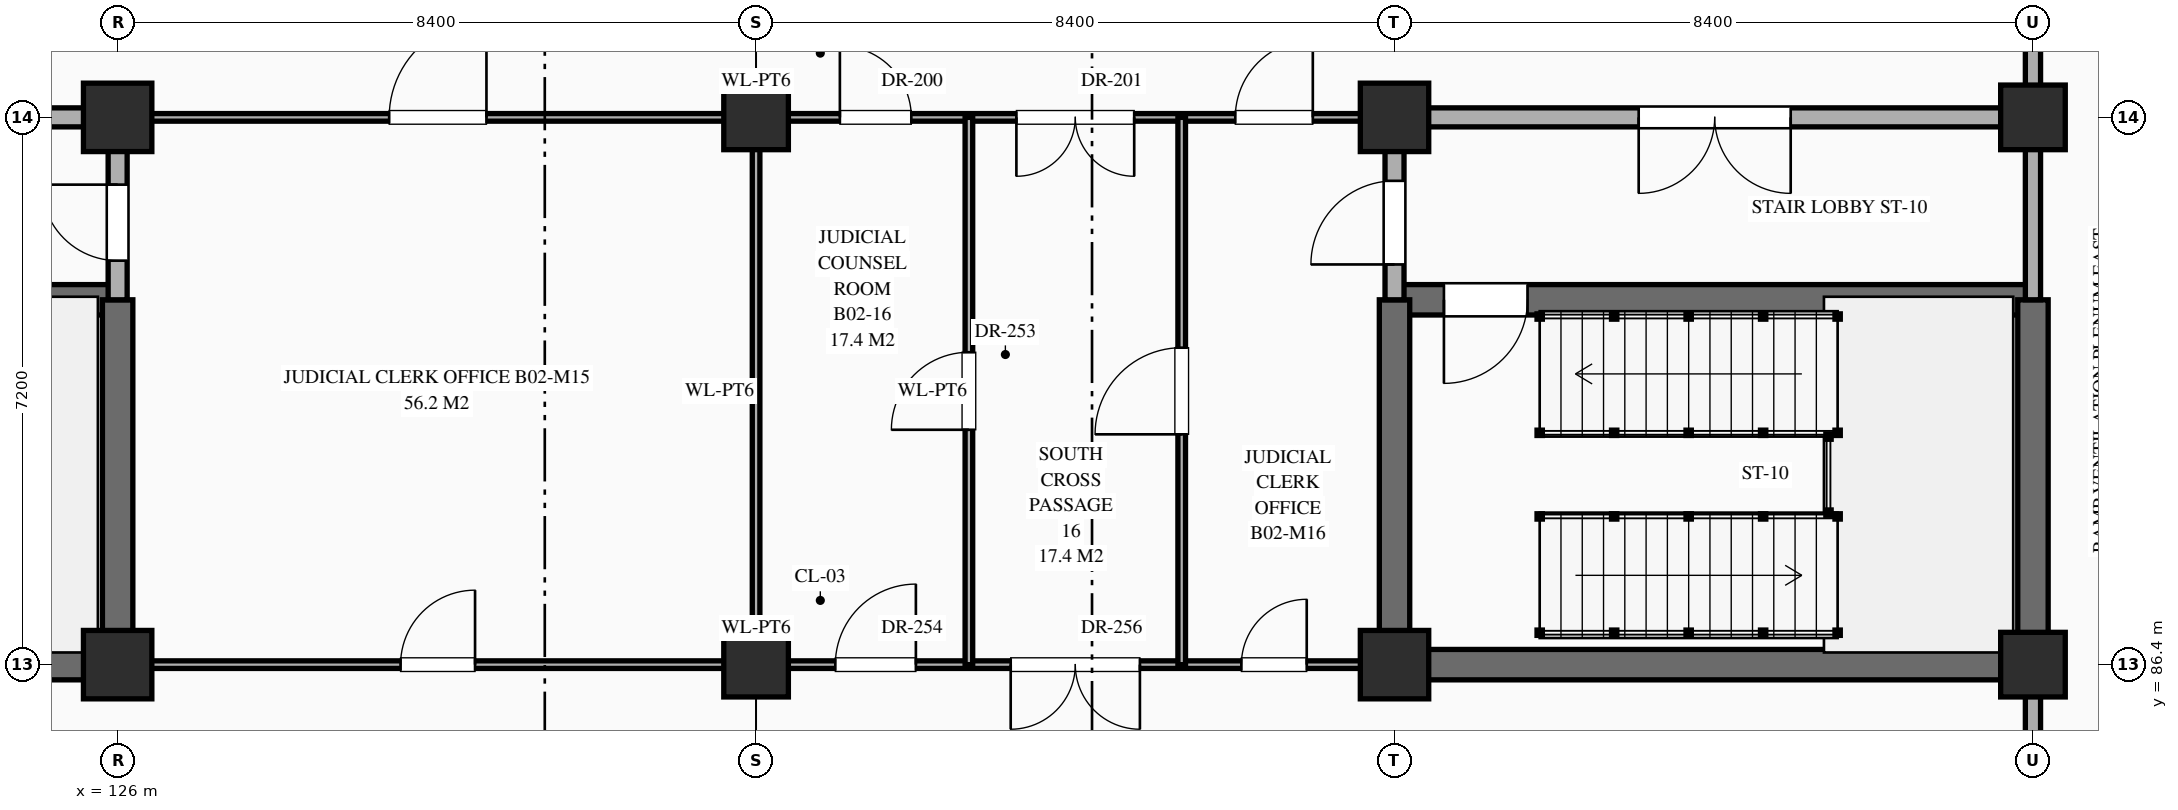
"""IFC4 building model, lengths in metres.
Left out: names, types, materials, properties, quantities, classifications, styles, units other than length and angle.
Written with IfcOpenShell. Run it as: python <this file> out.ifc"""

import sys

from ifc_helpers import new_model, si_unit, direction, frame, frame_2d, origin, origin_2d, place, context, subcontext, project, spatial, rectangle, extrude, element, fill, save


model = new_model("IFC4")
c1 = context("Model", 3, precision=1e-05, world=origin(), true_north=direction((0.0, 1.0)))
c2 = subcontext(c1, "Body", "Model", "MODEL_VIEW")
j1 = project(units=[si_unit("LENGTHUNIT", "METRE"), si_unit("PLANEANGLEUNIT", "RADIAN")], contexts=[c1])
p1 = place(None, origin())
s1 = spatial("IfcSite", under=j1, at=p1, CompositionType="ELEMENT")
p2 = place(p1, origin())
s2 = spatial("IfcBuilding", under=s1, at=p2, CompositionType="ELEMENT")
p3 = place(p2, frame((0.0, 0.0, -10.2)))
s3 = spatial("IfcBuildingStorey", under=s2, at=p3, CompositionType="ELEMENT", Elevation=-10.2)
for number, where, z_axis, x_axis in (
    (1, (126.0, 86.4, 0.0), (0.0, 0.0, 1.0), (1.0, 0.0, 0.0)),
    (2, (126.0, 93.6, 0.0), (0.0, 0.0, 1.0), (1.0, 0.0, 0.0)),
):
    element("IfcColumn", number, at=place(p3, frame(where, z_axis=z_axis, x_axis=x_axis)), inside=s3, PredefinedType="COLUMN", context=c2, shape_type="SweptSolid", body=[
        extrude(rectangle(XDim=0.9, YDim=0.9, at=origin_2d()), origin(), (0.0, 0.0, 1.0), 4.8),
    ])
for number, where, z_axis, x_axis in (
    (3, (134.4, 86.4, 0.0), (0.0, 0.0, 1.0), (1.0, 0.0, 0.0)),
    (4, (134.4, 93.6, 0.0), (0.0, 0.0, 1.0), (1.0, 0.0, 0.0)),
):
    element("IfcColumn", number, at=place(p3, frame(where, z_axis=z_axis, x_axis=x_axis)), inside=s3, PredefinedType="COLUMN", context=c2, shape_type="SweptSolid", body=[
        extrude(rectangle(XDim=0.85, YDim=0.85, at=origin_2d()), origin(), (0.0, 0.0, 1.0), 4.8),
    ])
for number, where, z_axis, x_axis in (
    (5, (142.8, 86.4, 0.0), (0.0, 0.0, 1.0), (1.0, 0.0, 0.0)),
    (6, (142.8, 93.6, 0.0), (0.0, 0.0, 1.0), (1.0, 0.0, 0.0)),
):
    element("IfcColumn", number, at=place(p3, frame(where, z_axis=z_axis, x_axis=x_axis)), inside=s3, PredefinedType="COLUMN", context=c2, shape_type="SweptSolid", body=[
        extrude(rectangle(XDim=0.9, YDim=0.9, at=origin_2d()), origin(), (0.0, 0.0, 1.0), 4.8),
    ])
for number, where, z_axis, x_axis in (
    (7, (151.2, 86.4, 0.0), (0.0, 0.0, 1.0), (1.0, 0.0, 0.0)),
    (8, (151.2, 93.6, 0.0), (0.0, 0.0, 1.0), (1.0, 0.0, 0.0)),
):
    element("IfcColumn", number, at=place(p3, frame(where, z_axis=z_axis, x_axis=x_axis)), inside=s3, PredefinedType="COLUMN", context=c2, shape_type="SweptSolid", body=[
        extrude(rectangle(XDim=0.85, YDim=0.85, at=origin_2d()), origin(), (0.0, 0.0, 1.0), 4.8),
    ])
p4 = place(p3, frame((117.6, 86.4, 0.0), z_axis=(0.0, 0.0, 1.0), x_axis=(1.0, 0.0, 0.0)))
e9 = element("IfcWall", 9, at=p4, inside=s3, PredefinedType="SHEAR", context=c2, shape_type="SweptSolid", body=[
    extrude(rectangle(XDim=8.4, YDim=0.4, at=frame_2d((4.2, 0.0))), origin(), (0.0, 0.0, 1.0), 4.48),
])
p5 = place(p3, frame((126.0, 86.4, 0.0), z_axis=(0.0, 0.0, 1.0), x_axis=(1.0, 0.0, 0.0)))
e10 = element("IfcWall", 10, at=p5, inside=s3, PredefinedType="STANDARD", context=c2, shape_type="SweptSolid", body=[
    extrude(rectangle(XDim=16.8, YDim=0.1, at=frame_2d((8.4, 0.0))), origin(), (0.0, 0.0, 1.0), 3.63),
])
p6 = place(p5, frame((3.722, 0.0, 0.0)))
e11 = element("IfcOpeningElement", 11, at=p6, cuts=e10, PredefinedType="OPENING", context=c2, shape_type="SweptSolid", body=[
    extrude(rectangle(XDim=0.98, YDim=2.35, at=frame_2d((0.49, 1.175))), frame((0.0, 0.062, 0.0), z_axis=(0.0, -1.0, 0.0), x_axis=(1.0, 0.0, 0.0)), (0.0, 0.0, 1.0), 0.124),
])
p7 = place(p5, frame((9.442, 0.0, 0.0)))
e12 = element("IfcOpeningElement", 12, at=p7, cuts=e10, PredefinedType="OPENING", context=c2, shape_type="SweptSolid", body=[
    extrude(rectangle(XDim=1.06, YDim=2.4, at=frame_2d((0.53, 1.2))), frame((0.0, 0.062, 0.0), z_axis=(0.0, -1.0, 0.0), x_axis=(1.0, 0.0, 0.0)), (0.0, 0.0, 1.0), 0.124),
])
p8 = place(p5, frame((11.75, 0.0, 0.0)))
e13 = element("IfcOpeningElement", 13, at=p8, cuts=e10, PredefinedType="OPENING", context=c2, shape_type="SweptSolid", body=[
    extrude(rectangle(XDim=1.7, YDim=2.45, at=frame_2d((0.85, 1.225))), frame((0.0, 0.062, 0.0), z_axis=(0.0, -1.0, 0.0), x_axis=(1.0, 0.0, 0.0)), (0.0, 0.0, 1.0), 0.124),
])
p9 = place(p5, frame((14.785, 0.0, 0.0)))
e14 = element("IfcOpeningElement", 14, at=p9, cuts=e10, PredefinedType="OPENING", context=c2, shape_type="SweptSolid", body=[
    extrude(rectangle(XDim=0.86, YDim=2.1, at=frame_2d((0.43, 1.05))), frame((0.0, 0.062, 0.0), z_axis=(0.0, -1.0, 0.0), x_axis=(1.0, 0.0, 0.0)), (0.0, 0.0, 1.0), 0.124),
])
p10 = place(p3, frame((142.8, 86.4, 0.0), z_axis=(0.0, 0.0, 1.0), x_axis=(1.0, 0.0, 0.0)))
e15 = element("IfcWall", 15, at=p10, inside=s3, PredefinedType="SHEAR", context=c2, shape_type="SweptSolid", body=[
    extrude(rectangle(XDim=8.4, YDim=0.4, at=frame_2d((4.2, 0.0))), origin(), (0.0, 0.0, 1.0), 4.48),
])
p11 = place(p3, frame((117.6, 91.2, 0.0), z_axis=(0.0, 0.0, 1.0), x_axis=(1.0, 0.0, 0.0)))
e16 = element("IfcWall", 16, at=p11, inside=s3, PredefinedType="SHEAR", context=c2, shape_type="SweptSolid", body=[
    extrude(rectangle(XDim=8.4, YDim=0.4, at=frame_2d((4.2, 0.0))), origin(), (0.0, 0.0, 1.0), 4.48),
])
p12 = place(p11, frame((0.65, 0.0, 0.0)))
e17 = element("IfcOpeningElement", 17, at=p12, cuts=e16, PredefinedType="OPENING", context=c2, shape_type="SweptSolid", body=[
    extrude(rectangle(XDim=1.1, YDim=2.2, at=frame_2d((0.55, 1.1))), frame((0.0, 0.212, 0.0), z_axis=(0.0, -1.0, 0.0), x_axis=(1.0, 0.0, 0.0)), (0.0, 0.0, 1.0), 0.424),
])
p13 = place(p3, frame((142.8, 91.2, 0.0), z_axis=(0.0, 0.0, 1.0), x_axis=(1.0, 0.0, 0.0)))
e18 = element("IfcWall", 18, at=p13, inside=s3, PredefinedType="SHEAR", context=c2, shape_type="SweptSolid", body=[
    extrude(rectangle(XDim=8.4, YDim=0.4, at=frame_2d((4.2, 0.0))), origin(), (0.0, 0.0, 1.0), 4.48),
])
p14 = place(p13, frame((0.65, 0.0, 0.0)))
e19 = element("IfcOpeningElement", 19, at=p14, cuts=e18, PredefinedType="OPENING", context=c2, shape_type="SweptSolid", body=[
    extrude(rectangle(XDim=1.1, YDim=2.2, at=frame_2d((0.55, 1.1))), frame((0.0, 0.212, 0.0), z_axis=(0.0, -1.0, 0.0), x_axis=(1.0, 0.0, 0.0)), (0.0, 0.0, 1.0), 0.424),
])
p15 = place(p3, frame((117.6, 93.6, 0.0), z_axis=(0.0, 0.0, 1.0), x_axis=(1.0, 0.0, 0.0)))
e20 = element("IfcWall", 20, at=p15, inside=s3, PredefinedType="STANDARD", context=c2, shape_type="SweptSolid", body=[
    extrude(rectangle(XDim=8.4, YDim=0.25, at=frame_2d((4.2, 0.0))), origin(), (0.0, 0.0, 1.0), 3.63),
])
p16 = place(p15, frame((3.212, 0.0, 0.0)))
e21 = element("IfcOpeningElement", 21, at=p16, cuts=e20, PredefinedType="OPENING", context=c2, shape_type="SweptSolid", body=[
    extrude(rectangle(XDim=2.0, YDim=2.4, at=frame_2d((1.0, 1.2))), frame((0.0, 0.137, 0.0), z_axis=(0.0, -1.0, 0.0), x_axis=(1.0, 0.0, 0.0)), (0.0, 0.0, 1.0), 0.274),
])
p17 = place(p3, frame((126.0, 93.6, 0.0), z_axis=(0.0, 0.0, 1.0), x_axis=(1.0, 0.0, 0.0)))
e22 = element("IfcWall", 22, at=p17, inside=s3, PredefinedType="STANDARD", context=c2, shape_type="SweptSolid", body=[
    extrude(rectangle(XDim=16.8, YDim=0.1, at=frame_2d((8.4, 0.0))), origin(), (0.0, 0.0, 1.0), 3.63),
])
p18 = place(p17, frame((3.573, 0.0, 0.0)))
e23 = element("IfcOpeningElement", 23, at=p18, cuts=e22, PredefinedType="OPENING", context=c2, shape_type="SweptSolid", body=[
    extrude(rectangle(XDim=1.28, YDim=2.35, at=frame_2d((0.64, 1.175))), frame((0.0, 0.062, 0.0), z_axis=(0.0, -1.0, 0.0), x_axis=(1.0, 0.0, 0.0)), (0.0, 0.0, 1.0), 0.124),
])
p19 = place(p17, frame((9.502, 0.0, 0.0)))
e24 = element("IfcOpeningElement", 24, at=p19, cuts=e22, PredefinedType="OPENING", context=c2, shape_type="SweptSolid", body=[
    extrude(rectangle(XDim=0.94, YDim=2.3, at=frame_2d((0.47, 1.15))), frame((0.0, 0.062, 0.0), z_axis=(0.0, -1.0, 0.0), x_axis=(1.0, 0.0, 0.0)), (0.0, 0.0, 1.0), 0.124),
])
p20 = place(p17, frame((11.825, 0.0, 0.0)))
e25 = element("IfcOpeningElement", 25, at=p20, cuts=e22, PredefinedType="OPENING", context=c2, shape_type="SweptSolid", body=[
    extrude(rectangle(XDim=1.55, YDim=2.35, at=frame_2d((0.775, 1.175))), frame((0.0, 0.062, 0.0), z_axis=(0.0, -1.0, 0.0), x_axis=(1.0, 0.0, 0.0)), (0.0, 0.0, 1.0), 0.124),
])
p21 = place(p17, frame((14.705, 0.0, 0.0)))
e26 = element("IfcOpeningElement", 26, at=p21, cuts=e22, PredefinedType="OPENING", context=c2, shape_type="SweptSolid", body=[
    extrude(rectangle(XDim=1.02, YDim=2.4, at=frame_2d((0.51, 1.2))), frame((0.0, 0.062, 0.0), z_axis=(0.0, -1.0, 0.0), x_axis=(1.0, 0.0, 0.0)), (0.0, 0.0, 1.0), 0.124),
])
p22 = place(p3, frame((142.8, 93.6, 0.0), z_axis=(0.0, 0.0, 1.0), x_axis=(1.0, 0.0, 0.0)))
e27 = element("IfcWall", 27, at=p22, inside=s3, PredefinedType="STANDARD", context=c2, shape_type="SweptSolid", body=[
    extrude(rectangle(XDim=8.4, YDim=0.25, at=frame_2d((4.2, 0.0))), origin(), (0.0, 0.0, 1.0), 3.63),
])
p23 = place(p22, frame((3.212, 0.0, 0.0)))
e28 = element("IfcOpeningElement", 28, at=p23, cuts=e27, PredefinedType="OPENING", context=c2, shape_type="SweptSolid", body=[
    extrude(rectangle(XDim=2.0, YDim=2.4, at=frame_2d((1.0, 1.2))), frame((0.0, 0.137, 0.0), z_axis=(0.0, -1.0, 0.0), x_axis=(1.0, 0.0, 0.0)), (0.0, 0.0, 1.0), 0.274),
])
p24 = place(p3, frame((126.0, 86.4, 0.0), z_axis=(0.0, 0.0, 1.0), x_axis=(0.0, 1.0, 0.0)))
e29 = element("IfcWall", 29, at=p24, inside=s3, PredefinedType="SHEAR", context=c2, shape_type="SweptSolid", body=[
    extrude(rectangle(XDim=4.8, YDim=0.4, at=frame_2d((2.4, 0.0))), origin(), (0.0, 0.0, 1.0), 4.48),
])
p25 = place(p3, frame((126.0, 91.2, 0.0), z_axis=(0.0, 0.0, 1.0), x_axis=(0.0, 1.0, 0.0)))
e30 = element("IfcWall", 30, at=p25, inside=s3, PredefinedType="STANDARD", context=c2, shape_type="SweptSolid", body=[
    extrude(rectangle(XDim=2.4, YDim=0.25, at=frame_2d((1.2, 0.0))), origin(), (0.0, 0.0, 1.0), 3.73),
])
p26 = place(p25, frame((0.515, 0.0, 0.0)))
e31 = element("IfcOpeningElement", 31, at=p26, cuts=e30, PredefinedType="OPENING", context=c2, shape_type="SweptSolid", body=[
    extrude(rectangle(XDim=1.0, YDim=2.2, at=frame_2d((0.5, 1.1))), frame((0.0, 0.137, 0.0), z_axis=(0.0, -1.0, 0.0), x_axis=(1.0, 0.0, 0.0)), (0.0, 0.0, 1.0), 0.274),
])
p27 = place(p3, frame((134.4, 86.4, 0.0), z_axis=(0.0, 0.0, 1.0), x_axis=(0.0, 1.0, 0.0)))
e32 = element("IfcWall", 32, at=p27, inside=s3, PredefinedType="STANDARD", context=c2, shape_type="SweptSolid", body=[
    extrude(rectangle(XDim=7.2, YDim=0.1, at=frame_2d((3.6, 0.0))), origin(), (0.0, 0.0, 1.0), 3.73),
])
p28 = place(p3, frame((137.2, 86.4, 0.0), z_axis=(0.0, 0.0, 1.0), x_axis=(0.0, 1.0, 0.0)))
e33 = element("IfcWall", 33, at=p28, inside=s3, PredefinedType="STANDARD", context=c2, shape_type="SweptSolid", body=[
    extrude(rectangle(XDim=7.2, YDim=0.1, at=frame_2d((3.6, 0.0))), origin(), (0.0, 0.0, 1.0), 4.48),
])
p29 = place(p28, frame((3.09, 0.0, 0.0)))
e34 = element("IfcOpeningElement", 34, at=p29, cuts=e33, PredefinedType="OPENING", context=c2, shape_type="SweptSolid", body=[
    extrude(rectangle(XDim=1.02, YDim=2.4, at=frame_2d((0.51, 1.2))), frame((0.0, 0.062, 0.0), z_axis=(0.0, -1.0, 0.0), x_axis=(1.0, 0.0, 0.0)), (0.0, 0.0, 1.0), 0.124),
])
p30 = place(p3, frame((140.0, 86.4, 0.0), z_axis=(0.0, 0.0, 1.0), x_axis=(0.0, 1.0, 0.0)))
e35 = element("IfcWall", 35, at=p30, inside=s3, PredefinedType="STANDARD", context=c2, shape_type="SweptSolid", body=[
    extrude(rectangle(XDim=7.2, YDim=0.1, at=frame_2d((3.6, 0.0))), origin(), (0.0, 0.0, 1.0), 4.48),
])
p31 = place(p30, frame((3.03, 0.0, 0.0)))
e36 = element("IfcOpeningElement", 36, at=p31, cuts=e35, PredefinedType="OPENING", context=c2, shape_type="SweptSolid", body=[
    extrude(rectangle(XDim=1.14, YDim=2.4, at=frame_2d((0.57, 1.2))), frame((0.0, 0.062, 0.0), z_axis=(0.0, -1.0, 0.0), x_axis=(1.0, 0.0, 0.0)), (0.0, 0.0, 1.0), 0.124),
])
p32 = place(p3, frame((142.8, 86.4, 0.0), z_axis=(0.0, 0.0, 1.0), x_axis=(0.0, 1.0, 0.0)))
e37 = element("IfcWall", 37, at=p32, inside=s3, PredefinedType="SHEAR", context=c2, shape_type="SweptSolid", body=[
    extrude(rectangle(XDim=4.8, YDim=0.4, at=frame_2d((2.4, 0.0))), origin(), (0.0, 0.0, 1.0), 4.48),
])
p33 = place(p3, frame((142.8, 91.2, 0.0), z_axis=(0.0, 0.0, 1.0), x_axis=(0.0, 1.0, 0.0)))
e38 = element("IfcWall", 38, at=p33, inside=s3, PredefinedType="STANDARD", context=c2, shape_type="SweptSolid", body=[
    extrude(rectangle(XDim=2.4, YDim=0.25, at=frame_2d((1.2, 0.0))), origin(), (0.0, 0.0, 1.0), 3.73),
])
p34 = place(p33, frame((0.465, 0.0, 0.0)))
e39 = element("IfcOpeningElement", 39, at=p34, cuts=e38, PredefinedType="OPENING", context=c2, shape_type="SweptSolid", body=[
    extrude(rectangle(XDim=1.1, YDim=2.2, at=frame_2d((0.55, 1.1))), frame((0.0, 0.137, 0.0), z_axis=(0.0, -1.0, 0.0), x_axis=(1.0, 0.0, 0.0)), (0.0, 0.0, 1.0), 0.274),
])
p35 = place(p3, frame((151.2, 64.8, 0.0), z_axis=(0.0, 0.0, 1.0), x_axis=(0.0, 1.0, 0.0)))
e40 = element("IfcWall", 40, at=p35, inside=s3, PredefinedType="STANDARD", context=c2, shape_type="SweptSolid", body=[
    extrude(rectangle(XDim=21.6, YDim=0.2, at=frame_2d((10.8, 0.0))), origin(), (0.0, 0.0, 1.0), 3.73),
])
p36 = place(p3, frame((151.2, 86.4, 0.0), z_axis=(0.0, 0.0, 1.0), x_axis=(0.0, 1.0, 0.0)))
e41 = element("IfcWall", 41, at=p36, inside=s3, PredefinedType="SHEAR", context=c2, shape_type="SweptSolid", body=[
    extrude(rectangle(XDim=4.8, YDim=0.4, at=frame_2d((2.4, 0.0))), origin(), (0.0, 0.0, 1.0), 4.48),
])
p37 = place(p3, frame((151.2, 91.2, 0.0), z_axis=(0.0, 0.0, 1.0), x_axis=(0.0, 1.0, 0.0)))
e42 = element("IfcWall", 42, at=p37, inside=s3, PredefinedType="STANDARD", context=c2, shape_type="SweptSolid", body=[
    extrude(rectangle(XDim=16.8, YDim=0.2, at=frame_2d((8.4, 0.0))), origin(), (0.0, 0.0, 1.0), 3.73),
])
p38 = place(p14, frame((1.1, 0.0, 0.0), z_axis=(0.0, 0.0, 1.0), x_axis=(-1.0, 0.0, 0.0)))
e43 = element("IfcDoor", 43, at=p38, inside=s3, OperationType="SINGLE_SWING_RIGHT", PredefinedType="DOOR", context=c2, shape_type="SweptSolid", body=[
    extrude(rectangle(XDim=1.1, YDim=2.2, at=frame_2d((0.55, 1.1))), frame((0.0, 0.025, 0.0), z_axis=(0.0, -1.0, 0.0), x_axis=(1.0, 0.0, 0.0)), (0.0, 0.0, 1.0), 0.05),
])
fill(e19, e43)
p39 = place(p26, origin())
e44 = element("IfcDoor", 44, at=p39, inside=s3, OperationType="SINGLE_SWING_RIGHT", PredefinedType="DOOR", context=c2, shape_type="SweptSolid", body=[
    extrude(rectangle(XDim=1.0, YDim=2.2, at=frame_2d((0.5, 1.1))), frame((0.0, 0.025, 0.0), z_axis=(0.0, -1.0, 0.0), x_axis=(1.0, 0.0, 0.0)), (0.0, 0.0, 1.0), 0.05),
])
fill(e31, e44)
p40 = place(p23, frame((2.0, 0.0, 0.0), z_axis=(0.0, 0.0, 1.0), x_axis=(-1.0, 0.0, 0.0)))
e45 = element("IfcDoor", 45, at=p40, inside=s3, OperationType="DOUBLE_DOOR_SINGLE_SWING", PredefinedType="DOOR", context=c2, shape_type="SweptSolid", body=[
    extrude(rectangle(XDim=2.0, YDim=2.4, at=frame_2d((1.0, 1.2))), frame((0.0, 0.025, 0.0), z_axis=(0.0, -1.0, 0.0), x_axis=(1.0, 0.0, 0.0)), (0.0, 0.0, 1.0), 0.05),
])
fill(e28, e45)
p41 = place(p34, origin())
e46 = element("IfcDoor", 46, at=p41, inside=s3, OperationType="SINGLE_SWING_LEFT", PredefinedType="DOOR", context=c2, shape_type="SweptSolid", body=[
    extrude(rectangle(XDim=1.1, YDim=2.2, at=frame_2d((0.55, 1.1))), frame((0.0, 0.025, 0.0), z_axis=(0.0, -1.0, 0.0), x_axis=(1.0, 0.0, 0.0)), (0.0, 0.0, 1.0), 0.05),
])
fill(e39, e46)
p42 = place(p18, origin())
e47 = element("IfcDoor", 47, at=p42, inside=s3, OperationType="SINGLE_SWING_RIGHT", PredefinedType="DOOR", context=c2, shape_type="SweptSolid", body=[
    extrude(rectangle(XDim=1.28, YDim=2.35, at=frame_2d((0.64, 1.175))), frame((0.0, 0.025, 0.0), z_axis=(0.0, -1.0, 0.0), x_axis=(1.0, 0.0, 0.0)), (0.0, 0.0, 1.0), 0.05),
])
fill(e23, e47)
p43 = place(p19, origin())
e48 = element("IfcDoor", 48, at=p43, inside=s3, OperationType="SINGLE_SWING_LEFT", PredefinedType="DOOR", context=c2, shape_type="SweptSolid", body=[
    extrude(rectangle(XDim=0.94, YDim=2.3, at=frame_2d((0.47, 1.15))), frame((0.0, 0.025, 0.0), z_axis=(0.0, -1.0, 0.0), x_axis=(1.0, 0.0, 0.0)), (0.0, 0.0, 1.0), 0.05),
])
fill(e24, e48)
p44 = place(p20, frame((1.55, 0.0, 0.0), z_axis=(0.0, 0.0, 1.0), x_axis=(-1.0, 0.0, 0.0)))
e49 = element("IfcDoor", 49, at=p44, inside=s3, OperationType="DOUBLE_DOOR_SINGLE_SWING", PredefinedType="DOOR", context=c2, shape_type="SweptSolid", body=[
    extrude(rectangle(XDim=1.55, YDim=2.35, at=frame_2d((0.775, 1.175))), frame((0.0, 0.025, 0.0), z_axis=(0.0, -1.0, 0.0), x_axis=(1.0, 0.0, 0.0)), (0.0, 0.0, 1.0), 0.05),
])
fill(e25, e49)
p45 = place(p21, origin())
e50 = element("IfcDoor", 50, at=p45, inside=s3, OperationType="SINGLE_SWING_RIGHT", PredefinedType="DOOR", context=c2, shape_type="SweptSolid", body=[
    extrude(rectangle(XDim=1.02, YDim=2.4, at=frame_2d((0.51, 1.2))), frame((0.0, 0.025, 0.0), z_axis=(0.0, -1.0, 0.0), x_axis=(1.0, 0.0, 0.0)), (0.0, 0.0, 1.0), 0.05),
])
fill(e26, e50)
p46 = place(p6, origin())
e51 = element("IfcDoor", 51, at=p46, inside=s3, OperationType="SINGLE_SWING_RIGHT", PredefinedType="DOOR", context=c2, shape_type="SweptSolid", body=[
    extrude(rectangle(XDim=0.98, YDim=2.35, at=frame_2d((0.49, 1.175))), frame((0.0, 0.025, 0.0), z_axis=(0.0, -1.0, 0.0), x_axis=(1.0, 0.0, 0.0)), (0.0, 0.0, 1.0), 0.05),
])
fill(e11, e51)
p47 = place(p29, origin())
e52 = element("IfcDoor", 52, at=p47, inside=s3, OperationType="SINGLE_SWING_LEFT", PredefinedType="DOOR", context=c2, shape_type="SweptSolid", body=[
    extrude(rectangle(XDim=1.02, YDim=2.4, at=frame_2d((0.51, 1.2))), frame((0.0, 0.025, 0.0), z_axis=(0.0, -1.0, 0.0), x_axis=(1.0, 0.0, 0.0)), (0.0, 0.0, 1.0), 0.05),
])
fill(e34, e52)
p48 = place(p7, origin())
e53 = element("IfcDoor", 53, at=p48, inside=s3, OperationType="SINGLE_SWING_RIGHT", PredefinedType="DOOR", context=c2, shape_type="SweptSolid", body=[
    extrude(rectangle(XDim=1.06, YDim=2.4, at=frame_2d((0.53, 1.2))), frame((0.0, 0.025, 0.0), z_axis=(0.0, -1.0, 0.0), x_axis=(1.0, 0.0, 0.0)), (0.0, 0.0, 1.0), 0.05),
])
fill(e12, e53)
p49 = place(p31, origin())
e54 = element("IfcDoor", 54, at=p49, inside=s3, OperationType="SINGLE_SWING_LEFT", PredefinedType="DOOR", context=c2, shape_type="SweptSolid", body=[
    extrude(rectangle(XDim=1.14, YDim=2.4, at=frame_2d((0.57, 1.2))), frame((0.0, 0.025, 0.0), z_axis=(0.0, -1.0, 0.0), x_axis=(1.0, 0.0, 0.0)), (0.0, 0.0, 1.0), 0.05),
])
fill(e36, e54)
p50 = place(p8, frame((1.7, 0.0, 0.0), z_axis=(0.0, 0.0, 1.0), x_axis=(-1.0, 0.0, 0.0)))
e55 = element("IfcDoor", 55, at=p50, inside=s3, OperationType="DOUBLE_DOOR_SINGLE_SWING", PredefinedType="DOOR", context=c2, shape_type="SweptSolid", body=[
    extrude(rectangle(XDim=1.7, YDim=2.45, at=frame_2d((0.85, 1.225))), frame((0.0, 0.025, 0.0), z_axis=(0.0, -1.0, 0.0), x_axis=(1.0, 0.0, 0.0)), (0.0, 0.0, 1.0), 0.05),
])
fill(e13, e55)
p51 = place(p9, origin())
e56 = element("IfcDoor", 56, at=p51, inside=s3, OperationType="SINGLE_SWING_RIGHT", PredefinedType="DOOR", context=c2, shape_type="SweptSolid", body=[
    extrude(rectangle(XDim=0.86, YDim=2.1, at=frame_2d((0.43, 1.05))), frame((0.0, 0.025, 0.0), z_axis=(0.0, -1.0, 0.0), x_axis=(1.0, 0.0, 0.0)), (0.0, 0.0, 1.0), 0.05),
])
fill(e14, e56)
save(model, sys.argv[1])
